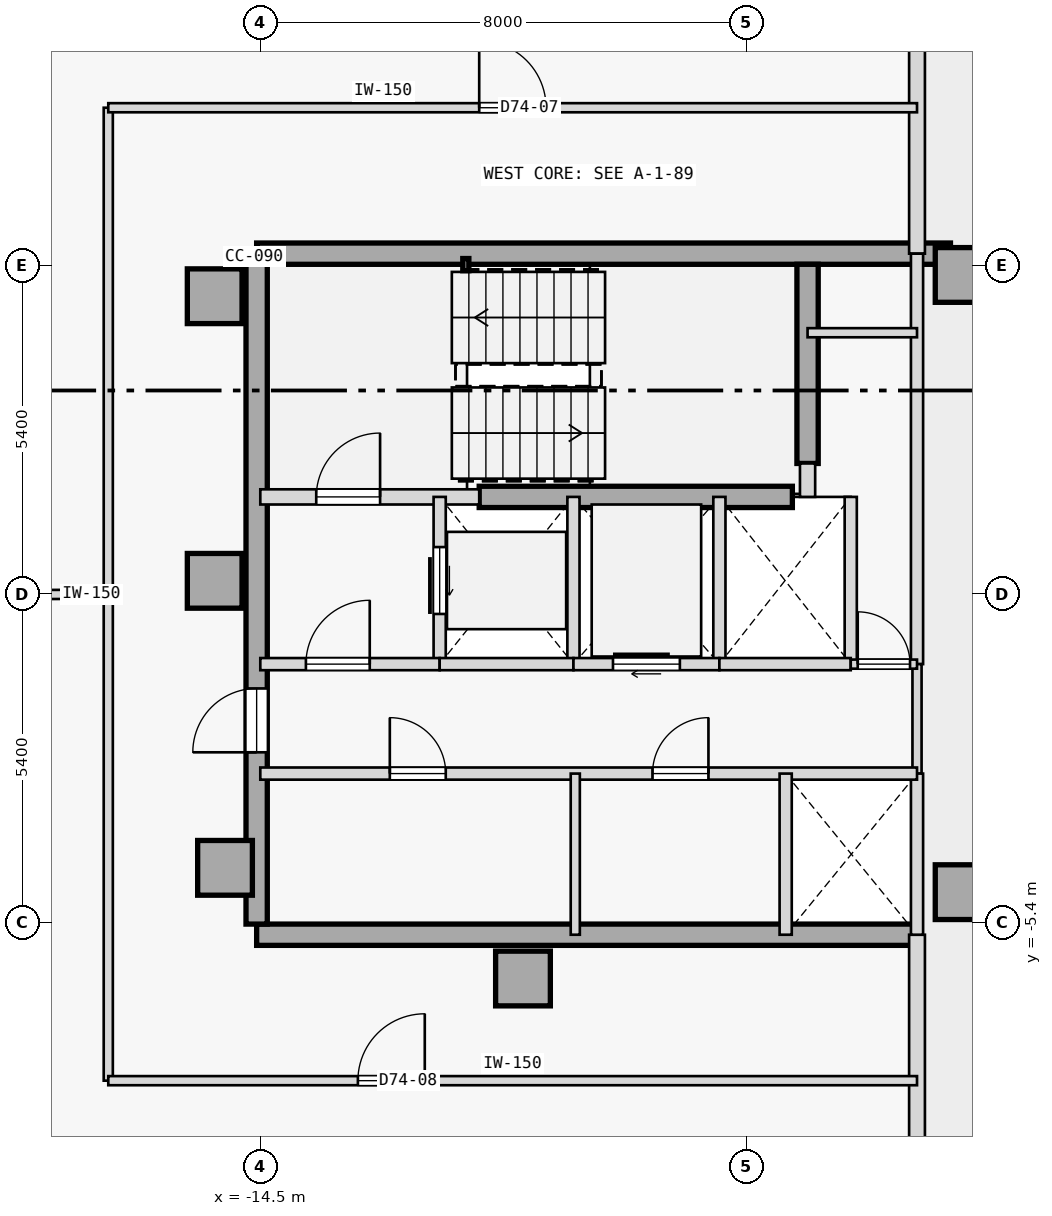
"""IFC4 building model, lengths in metres.
Left out: names, types, materials, properties, quantities, classifications, styles, units other than length and angle.
Written with IfcOpenShell. Run it as: python <this file> out.ifc"""

import sys

from ifc_helpers import new_model, si_unit, direction, frame, frame_2d, origin, origin_2d, place, context, subcontext, project, spatial, rectangle, hollow_rectangle, extrude, element, fill, save


model = new_model("IFC4")
c1 = context("Model", 3, precision=1e-05, world=origin(), true_north=direction((0.0, 1.0)))
c2 = subcontext(c1, "Body", "Model", "MODEL_VIEW")
j1 = project(units=[si_unit("LENGTHUNIT", "METRE"), si_unit("PLANEANGLEUNIT", "RADIAN")], contexts=[c1])
p1 = place(None, origin())
s1 = spatial("IfcSite", under=j1, at=p1, CompositionType="ELEMENT")
p2 = place(p1, origin())
s2 = spatial("IfcBuilding", under=s1, at=p2, CompositionType="ELEMENT")
p3 = place(p2, frame((0.0, 0.0, 275.6)))
s3 = spatial("IfcBuildingStorey", under=s2, at=p3, CompositionType="ELEMENT", Elevation=275.6)
for number, where, z_axis, x_axis in (
    (1, (-15.25, 4.9, 0.0), (0.0, 0.0, 1.0), (1.0, 0.0, 0.0)),
    (2, (-15.25, 0.22, 0.0), (0.0, 0.0, 1.0), (1.0, 0.0, 0.0)),
    (3, (-15.08, -4.5, 0.0), (0.0, 0.0, 1.0), (1.0, 0.0, 0.0)),
    (4, (-10.18, -6.32, 0.0), (0.0, 0.0, 1.0), (1.0, 0.0, 0.0)),
    (5, (-2.95, -4.9, 0.0), (0.0, 0.0, 1.0), (1.0, 0.0, 0.0)),
    (6, (-2.95, 5.25, 0.0), (0.0, 0.0, 1.0), (1.0, 0.0, 0.0)),
):
    element("IfcColumn", number, at=place(p3, frame(where, z_axis=z_axis, x_axis=x_axis)), inside=s3, PredefinedType="COLUMN", context=c2, shape_type="SweptSolid", body=[
        extrude(rectangle(XDim=0.9, YDim=0.9, at=origin_2d()), origin(), (0.0, 0.0, 1.0), 6.3),
    ])
p4 = place(p3, frame((-14.56, 5.6, 0.0), z_axis=(0.0, 0.0, 1.0), x_axis=(1.0, 0.0, 0.0)))
e7 = element("IfcWall", 7, at=p4, inside=s3, PredefinedType="SHEAR", context=c2, shape_type="SweptSolid", body=[
    extrude(rectangle(XDim=11.41, YDim=0.35, at=frame_2d((5.705, 0.0))), origin(), (0.0, 0.0, 1.0), 6.075),
])
p5 = place(p3, frame((-14.56, -5.6, 0.0), z_axis=(0.0, 0.0, 1.0), x_axis=(1.0, 0.0, 0.0)))
e8 = element("IfcWall", 8, at=p5, inside=s3, PredefinedType="SHEAR", context=c2, shape_type="SweptSolid", body=[
    extrude(rectangle(XDim=10.86, YDim=0.35, at=frame_2d((5.43, 0.0))), origin(), (0.0, 0.0, 1.0), 6.075),
])
p6 = place(p3, frame((-14.56, -5.425, 0.0), z_axis=(0.0, 0.0, 1.0), x_axis=(0.0, 1.0, 0.0)))
e9 = element("IfcWall", 9, at=p6, inside=s3, PredefinedType="SHEAR", context=c2, shape_type="SweptSolid", body=[
    extrude(rectangle(XDim=10.85, YDim=0.35, at=frame_2d((5.425, 0.0))), origin(), (0.0, 0.0, 1.0), 6.075),
])
p7 = place(p6, frame((2.825, 0.0, 0.0)))
e10 = element("IfcOpeningElement", 10, at=p7, cuts=e9, PredefinedType="OPENING", context=c2, shape_type="SweptSolid", body=[
    extrude(rectangle(XDim=1.05, YDim=2.15, at=frame_2d((0.525, 1.075))), frame((0.0, 0.185, 0.0), z_axis=(0.0, -1.0, 0.0), x_axis=(1.0, 0.0, 0.0)), (0.0, 0.0, 1.0), 0.37),
])
p8 = place(p3, frame((-5.5, 2.15, 0.0), z_axis=(0.0, 0.0, 1.0), x_axis=(0.0, 1.0, 0.0)))
e11 = element("IfcWall", 11, at=p8, inside=s3, PredefinedType="SHEAR", context=c2, shape_type="SweptSolid", body=[
    extrude(rectangle(XDim=3.275, YDim=0.35, at=frame_2d((1.638, 0.0))), origin(), (0.0, 0.0, 1.0), 6.075),
])
p9 = place(p3, frame((-10.9, 1.6, 0.0), z_axis=(0.0, 0.0, 1.0), x_axis=(1.0, 0.0, 0.0)))
e12 = element("IfcWall", 12, at=p9, inside=s3, PredefinedType="SHEAR", context=c2, shape_type="SweptSolid", body=[
    extrude(rectangle(XDim=5.15, YDim=0.35, at=frame_2d((2.575, 0.0))), origin(), (0.0, 0.0, 1.0), 6.075),
])
p10 = place(p3, frame((-11.12, 5.42, 0.0), z_axis=(0.0, 0.0, 1.0), x_axis=(1.0, 0.0, 0.0)))
e13 = element("IfcColumn", 13, at=p10, inside=s3, PredefinedType="COLUMN", context=c2, shape_type="SweptSolid", body=[
    extrude(hollow_rectangle(XDim=0.1, YDim=0.2, WallThickness=0.008, at=origin_2d()), origin(), (0.0, 0.0, 1.0), 6.3),
])
p11 = place(p3, frame((-3.7, -22.0, 0.0), z_axis=(0.0, 0.0, 1.0), x_axis=(0.0, 1.0, 0.0)))
e14 = element("IfcWall", 14, at=p11, inside=s3, PredefinedType="STANDARD", context=c2, shape_type="SweptSolid", body=[
    extrude(rectangle(XDim=16.4, YDim=0.26, at=frame_2d((8.2, 0.0))), origin(), (0.0, 0.0, 1.0), 6.075),
])
p12 = place(p3, frame((-3.7, 5.6, 0.0), z_axis=(0.0, 0.0, 1.0), x_axis=(0.0, 1.0, 0.0)))
e15 = element("IfcWall", 15, at=p12, inside=s3, PredefinedType="STANDARD", context=c2, shape_type="SweptSolid", body=[
    extrude(rectangle(XDim=10.082, YDim=0.26, at=frame_2d((5.041, 0.0))), origin(), (0.0, 0.0, 1.0), 5.625),
])
p13 = place(p12, frame((4.491, 0.0, 0.0)))
e16 = element("IfcOpeningElement", 16, at=p13, cuts=e15, PredefinedType="OPENING", context=c2, shape_type="SweptSolid", body=[
    extrude(rectangle(XDim=1.1, YDim=2.2, at=frame_2d((0.55, 1.1))), frame((0.0, 0.14, 0.0), z_axis=(0.0, -1.0, 0.0), x_axis=(1.0, 0.0, 0.0)), (0.0, 0.0, 1.0), 0.28),
])
p14 = place(p3, frame((-14.5, 1.6, 0.0), z_axis=(0.0, 0.0, 1.0), x_axis=(1.0, 0.0, 0.0)))
e17 = element("IfcWall", 17, at=p14, inside=s3, PredefinedType="STANDARD", context=c2, shape_type="SweptSolid", body=[
    extrude(rectangle(XDim=3.6, YDim=0.25, at=frame_2d((1.8, 0.0))), origin(), (0.0, 0.0, 1.0), 6.075),
])
p15 = place(p14, frame((0.92, 0.0, 0.0)))
e18 = element("IfcOpeningElement", 18, at=p15, cuts=e17, PredefinedType="OPENING", context=c2, shape_type="SweptSolid", body=[
    extrude(rectangle(XDim=1.05, YDim=2.15, at=frame_2d((0.525, 1.075))), frame((0.0, 0.135, 0.0), z_axis=(0.0, -1.0, 0.0), x_axis=(1.0, 0.0, 0.0)), (0.0, 0.0, 1.0), 0.27),
])
p16 = place(p3, frame((-5.5, 1.6, 0.0), z_axis=(0.0, 0.0, 1.0), x_axis=(0.0, 1.0, 0.0)))
e19 = element("IfcWall", 19, at=p16, inside=s3, PredefinedType="STANDARD", context=c2, shape_type="SweptSolid", body=[
    extrude(rectangle(XDim=0.55, YDim=0.25, at=frame_2d((0.275, 0.0))), origin(), (0.0, 0.0, 1.0), 6.075),
])
p17 = place(p3, frame((-3.7, -1.15, 0.0), z_axis=(0.0, 0.0, 1.0), x_axis=(0.0, 1.0, 0.0)))
e20 = element("IfcWall", 20, at=p17, inside=s3, PredefinedType="STANDARD", context=c2, shape_type="SweptSolid", body=[
    extrude(rectangle(XDim=6.75, YDim=0.2, at=frame_2d((3.375, 0.0))), origin(), (0.0, 0.0, 1.0), 6.075),
])
p18 = place(p3, frame((-3.7, -2.95, 0.0), z_axis=(0.0, 0.0, 1.0), x_axis=(0.0, 1.0, 0.0)))
e21 = element("IfcWall", 21, at=p18, inside=s3, PredefinedType="PARTITIONING", context=c2, shape_type="SweptSolid", body=[
    extrude(rectangle(XDim=1.8, YDim=0.15, at=frame_2d((0.9, 0.0))), origin(), (0.0, 0.0, 1.0), 6.075),
])
p19 = place(p3, frame((-3.7, -5.6, 0.0), z_axis=(0.0, 0.0, 1.0), x_axis=(0.0, 1.0, 0.0)))
e22 = element("IfcWall", 22, at=p19, inside=s3, PredefinedType="STANDARD", context=c2, shape_type="SweptSolid", body=[
    extrude(rectangle(XDim=2.65, YDim=0.2, at=frame_2d((1.325, 0.0))), origin(), (0.0, 0.0, 1.0), 6.075),
])
p20 = place(p3, frame((-11.55, -1.15, 0.0), z_axis=(0.0, 0.0, 1.0), x_axis=(0.0, 1.0, 0.0)))
e23 = element("IfcWall", 23, at=p20, inside=s3, PredefinedType="STANDARD", context=c2, shape_type="SweptSolid", body=[
    extrude(rectangle(XDim=2.75, YDim=0.2, at=frame_2d((1.375, 0.0))), origin(), (0.0, 0.0, 1.0), 6.075),
])
p21 = place(p20, frame((0.825, 0.0, 0.0)))
e24 = element("IfcOpeningElement", 24, at=p21, cuts=e23, PredefinedType="OPENING", context=c2, shape_type="SweptSolid", body=[
    extrude(rectangle(XDim=1.1, YDim=2.15, at=frame_2d((0.55, 1.075))), frame((0.0, 0.11, 0.0), z_axis=(0.0, -1.0, 0.0), x_axis=(1.0, 0.0, 0.0)), (0.0, 0.0, 1.0), 0.22),
])
p22 = place(p3, frame((-9.35, -1.15, 0.0), z_axis=(0.0, 0.0, 1.0), x_axis=(0.0, 1.0, 0.0)))
e25 = element("IfcWall", 25, at=p22, inside=s3, PredefinedType="STANDARD", context=c2, shape_type="SweptSolid", body=[
    extrude(rectangle(XDim=2.75, YDim=0.2, at=frame_2d((1.375, 0.0))), origin(), (0.0, 0.0, 1.0), 6.075),
])
p23 = place(p3, frame((-14.5, -1.15, 0.0), z_axis=(0.0, 0.0, 1.0), x_axis=(1.0, 0.0, 0.0)))
e26 = element("IfcWall", 26, at=p23, inside=s3, PredefinedType="STANDARD", context=c2, shape_type="SweptSolid", body=[
    extrude(rectangle(XDim=2.95, YDim=0.2, at=frame_2d((1.475, 0.0))), origin(), (0.0, 0.0, 1.0), 6.075),
])
p24 = place(p23, frame((0.75, 0.0, 0.0)))
e27 = element("IfcOpeningElement", 27, at=p24, cuts=e26, PredefinedType="OPENING", context=c2, shape_type="SweptSolid", body=[
    extrude(rectangle(XDim=1.05, YDim=2.18, at=frame_2d((0.525, 1.09))), frame((0.0, 0.11, 0.0), z_axis=(0.0, -1.0, 0.0), x_axis=(1.0, 0.0, 0.0)), (0.0, 0.0, 1.0), 0.22),
])
p25 = place(p3, frame((-11.55, -1.15, 0.0), z_axis=(0.0, 0.0, 1.0), x_axis=(1.0, 0.0, 0.0)))
e28 = element("IfcWall", 28, at=p25, inside=s3, PredefinedType="STANDARD", context=c2, shape_type="SweptSolid", body=[
    extrude(rectangle(XDim=2.2, YDim=0.2, at=frame_2d((1.1, 0.0))), origin(), (0.0, 0.0, 1.0), 6.075),
])
p26 = place(p3, frame((-6.95, -1.15, 0.0), z_axis=(0.0, 0.0, 1.0), x_axis=(0.0, 1.0, 0.0)))
e29 = element("IfcWall", 29, at=p26, inside=s3, PredefinedType="STANDARD", context=c2, shape_type="SweptSolid", body=[
    extrude(rectangle(XDim=2.75, YDim=0.2, at=frame_2d((1.375, 0.0))), origin(), (0.0, 0.0, 1.0), 6.075),
])
p27 = place(p3, frame((-9.35, -1.15, 0.0), z_axis=(0.0, 0.0, 1.0), x_axis=(1.0, 0.0, 0.0)))
e30 = element("IfcWall", 30, at=p27, inside=s3, PredefinedType="STANDARD", context=c2, shape_type="SweptSolid", body=[
    extrude(rectangle(XDim=2.4, YDim=0.2, at=frame_2d((1.2, 0.0))), origin(), (0.0, 0.0, 1.0), 6.075),
])
p28 = place(p27, frame((0.65, 0.0, 0.0)))
e31 = element("IfcOpeningElement", 31, at=p28, cuts=e30, PredefinedType="OPENING", context=c2, shape_type="SweptSolid", body=[
    extrude(rectangle(XDim=1.1, YDim=2.15, at=frame_2d((0.55, 1.075))), frame((0.0, 0.11, 0.0), z_axis=(0.0, -1.0, 0.0), x_axis=(1.0, 0.0, 0.0)), (0.0, 0.0, 1.0), 0.22),
])
p29 = place(p3, frame((-4.79, -1.15, 0.0), z_axis=(0.0, 0.0, 1.0), x_axis=(0.0, 1.0, 0.0)))
e32 = element("IfcWall", 32, at=p29, inside=s3, PredefinedType="STANDARD", context=c2, shape_type="SweptSolid", body=[
    extrude(rectangle(XDim=2.75, YDim=0.2, at=frame_2d((1.375, 0.0))), origin(), (0.0, 0.0, 1.0), 6.075),
])
p30 = place(p3, frame((-6.95, -1.15, 0.0), z_axis=(0.0, 0.0, 1.0), x_axis=(1.0, 0.0, 0.0)))
e33 = element("IfcWall", 33, at=p30, inside=s3, PredefinedType="STANDARD", context=c2, shape_type="SweptSolid", body=[
    extrude(rectangle(XDim=2.16, YDim=0.2, at=frame_2d((1.08, 0.0))), origin(), (0.0, 0.0, 1.0), 6.075),
])
p31 = place(p3, frame((-4.79, -1.15, 0.0), z_axis=(0.0, 0.0, 1.0), x_axis=(1.0, 0.0, 0.0)))
e34 = element("IfcWall", 34, at=p31, inside=s3, PredefinedType="PARTITIONING", context=c2, shape_type="SweptSolid", body=[
    extrude(rectangle(XDim=1.09, YDim=0.15, at=frame_2d((0.545, 0.0))), origin(), (0.0, 0.0, 1.0), 6.075),
])
p32 = place(p31, frame((0.115, 0.0, 0.0)))
e35 = element("IfcOpeningElement", 35, at=p32, cuts=e34, PredefinedType="OPENING", context=c2, shape_type="SweptSolid", body=[
    extrude(rectangle(XDim=0.86, YDim=2.15, at=frame_2d((0.43, 1.075))), frame((0.0, 0.085, 0.0), z_axis=(0.0, -1.0, 0.0), x_axis=(1.0, 0.0, 0.0)), (0.0, 0.0, 1.0), 0.17),
])
p33 = place(p3, frame((-14.5, -2.95, 0.0), z_axis=(0.0, 0.0, 1.0), x_axis=(1.0, 0.0, 0.0)))
e36 = element("IfcWall", 36, at=p33, inside=s3, PredefinedType="STANDARD", context=c2, shape_type="SweptSolid", body=[
    extrude(rectangle(XDim=10.8, YDim=0.2, at=frame_2d((5.4, 0.0))), origin(), (0.0, 0.0, 1.0), 6.075),
])
p34 = place(p33, frame((2.13, 0.0, 0.0)))
e37 = element("IfcOpeningElement", 37, at=p34, cuts=e36, PredefinedType="OPENING", context=c2, shape_type="SweptSolid", body=[
    extrude(rectangle(XDim=0.92, YDim=2.15, at=frame_2d((0.46, 1.075))), frame((0.0, 0.11, 0.0), z_axis=(0.0, -1.0, 0.0), x_axis=(1.0, 0.0, 0.0)), (0.0, 0.0, 1.0), 0.22),
])
p35 = place(p33, frame((6.45, 0.0, 0.0)))
e38 = element("IfcOpeningElement", 38, at=p35, cuts=e36, PredefinedType="OPENING", context=c2, shape_type="SweptSolid", body=[
    extrude(rectangle(XDim=0.92, YDim=2.15, at=frame_2d((0.46, 1.075))), frame((0.0, 0.11, 0.0), z_axis=(0.0, -1.0, 0.0), x_axis=(1.0, 0.0, 0.0)), (0.0, 0.0, 1.0), 0.22),
])
p36 = place(p3, frame((-5.86, -5.6, 0.0), z_axis=(0.0, 0.0, 1.0), x_axis=(0.0, 1.0, 0.0)))
e39 = element("IfcWall", 39, at=p36, inside=s3, PredefinedType="STANDARD", context=c2, shape_type="SweptSolid", body=[
    extrude(rectangle(XDim=2.65, YDim=0.2, at=frame_2d((1.325, 0.0))), origin(), (0.0, 0.0, 1.0), 6.075),
])
p37 = place(p3, frame((-9.32, -5.6, 0.0), z_axis=(0.0, 0.0, 1.0), x_axis=(0.0, 1.0, 0.0)))
e40 = element("IfcWall", 40, at=p37, inside=s3, PredefinedType="PARTITIONING", context=c2, shape_type="SweptSolid", body=[
    extrude(rectangle(XDim=2.65, YDim=0.15, at=frame_2d((1.325, 0.0))), origin(), (0.0, 0.0, 1.0), 6.075),
])
p38 = place(p3, frame((-5.5, 4.3, 0.0), z_axis=(0.0, 0.0, 1.0), x_axis=(1.0, 0.0, 0.0)))
e41 = element("IfcWall", 41, at=p38, inside=s3, PredefinedType="PARTITIONING", context=c2, shape_type="SweptSolid", body=[
    extrude(rectangle(XDim=1.8, YDim=0.15, at=frame_2d((0.9, 0.0))), origin(), (0.0, 0.0, 1.0), 6.075),
])
p39 = place(p3, frame((-17.0, 0.0, 0.0), z_axis=(0.0, 0.0, 1.0), x_axis=(0.0, 1.0, 0.0)))
e42 = element("IfcWall", 42, at=p39, inside=s3, PredefinedType="PARTITIONING", context=c2, shape_type="SweptSolid", body=[
    extrude(rectangle(XDim=8.0, YDim=0.15, at=frame_2d((4.0, 0.0))), origin(), (0.0, 0.0, 1.0), 6.075),
])
p40 = place(p3, frame((-17.0, 8.0, 0.0), z_axis=(0.0, 0.0, 1.0), x_axis=(1.0, 0.0, 0.0)))
e43 = element("IfcWall", 43, at=p40, inside=s3, PredefinedType="PARTITIONING", context=c2, shape_type="SweptSolid", body=[
    extrude(rectangle(XDim=13.3, YDim=0.15, at=frame_2d((6.65, 0.0))), origin(), (0.0, 0.0, 1.0), 6.075),
])
p41 = place(p40, frame((6.1, 0.0, 0.0)))
e44 = element("IfcOpeningElement", 44, at=p41, cuts=e43, PredefinedType="OPENING", context=c2, shape_type="SweptSolid", body=[
    extrude(rectangle(XDim=1.1, YDim=2.15, at=frame_2d((0.55, 1.075))), frame((0.0, 0.085, 0.0), z_axis=(0.0, -1.0, 0.0), x_axis=(1.0, 0.0, 0.0)), (0.0, 0.0, 1.0), 0.17),
])
p42 = place(p3, frame((-17.0, -8.0, 0.0), z_axis=(0.0, 0.0, 1.0), x_axis=(0.0, 1.0, 0.0)))
e45 = element("IfcWall", 45, at=p42, inside=s3, PredefinedType="PARTITIONING", context=c2, shape_type="SweptSolid", body=[
    extrude(rectangle(XDim=8.0, YDim=0.15, at=frame_2d((4.0, 0.0))), origin(), (0.0, 0.0, 1.0), 6.075),
])
p43 = place(p3, frame((-17.0, -8.0, 0.0), z_axis=(0.0, 0.0, 1.0), x_axis=(1.0, 0.0, 0.0)))
e46 = element("IfcWall", 46, at=p43, inside=s3, PredefinedType="PARTITIONING", context=c2, shape_type="SweptSolid", body=[
    extrude(rectangle(XDim=13.3, YDim=0.15, at=frame_2d((6.65, 0.0))), origin(), (0.0, 0.0, 1.0), 6.075),
])
p44 = place(p43, frame((4.105, 0.0, 0.0)))
e47 = element("IfcOpeningElement", 47, at=p44, cuts=e46, PredefinedType="OPENING", context=c2, shape_type="SweptSolid", body=[
    extrude(rectangle(XDim=1.1, YDim=2.15, at=frame_2d((0.55, 1.075))), frame((0.0, 0.085, 0.0), z_axis=(0.0, -1.0, 0.0), x_axis=(1.0, 0.0, 0.0)), (0.0, 0.0, 1.0), 0.17),
])
p45 = place(p3, frame((-29.838, -0.061, 0.0), z_axis=(0.0, 0.0, 1.0), x_axis=(0.999988608793, 0.004773079162, 0.0)))
e48 = element("IfcWall", 48, at=p45, inside=s3, PredefinedType="PARTITIONING", context=c2, shape_type="SweptSolid", body=[
    extrude(rectangle(XDim=12.839, YDim=0.15, at=frame_2d((6.419, 0.0))), origin(), (0.0, 0.0, 1.0), 6.075),
])
p46 = place(p15, origin())
e49 = element("IfcDoor", 49, at=p46, inside=s3, OperationType="SINGLE_SWING_RIGHT", PredefinedType="DOOR", context=c2, shape_type="SweptSolid", body=[
    extrude(rectangle(XDim=1.05, YDim=2.15, at=frame_2d((0.525, 1.075))), frame((0.0, 0.025, 0.0), z_axis=(0.0, -1.0, 0.0), x_axis=(1.0, 0.0, 0.0)), (0.0, 0.0, 1.0), 0.05),
])
fill(e18, e49)
p47 = place(p24, origin())
e50 = element("IfcDoor", 50, at=p47, inside=s3, OperationType="SINGLE_SWING_RIGHT", PredefinedType="DOOR", context=c2, shape_type="SweptSolid", body=[
    extrude(rectangle(XDim=1.05, YDim=2.18, at=frame_2d((0.525, 1.09))), frame((0.0, 0.025, 0.0), z_axis=(0.0, -1.0, 0.0), x_axis=(1.0, 0.0, 0.0)), (0.0, 0.0, 1.0), 0.05),
])
fill(e27, e50)
p48 = place(p21, origin())
e51 = element("IfcDoor", 51, at=p48, inside=s3, OperationType="SLIDING_TO_RIGHT", PredefinedType="DOOR", context=c2, shape_type="SweptSolid", body=[
    extrude(rectangle(XDim=1.1, YDim=2.15, at=frame_2d((0.55, 1.075))), frame((0.0, 0.025, 0.0), z_axis=(0.0, -1.0, 0.0), x_axis=(1.0, 0.0, 0.0)), (0.0, 0.0, 1.0), 0.05),
])
fill(e24, e51)
p49 = place(p28, origin())
e52 = element("IfcDoor", 52, at=p49, inside=s3, OperationType="SLIDING_TO_RIGHT", PredefinedType="DOOR", context=c2, shape_type="SweptSolid", body=[
    extrude(rectangle(XDim=1.1, YDim=2.15, at=frame_2d((0.55, 1.075))), frame((0.0, 0.025, 0.0), z_axis=(0.0, -1.0, 0.0), x_axis=(1.0, 0.0, 0.0)), (0.0, 0.0, 1.0), 0.05),
])
fill(e31, e52)
p50 = place(p34, origin())
e53 = element("IfcDoor", 53, at=p50, inside=s3, OperationType="SINGLE_SWING_LEFT", PredefinedType="DOOR", context=c2, shape_type="SweptSolid", body=[
    extrude(rectangle(XDim=0.92, YDim=2.15, at=frame_2d((0.46, 1.075))), frame((0.0, 0.025, 0.0), z_axis=(0.0, -1.0, 0.0), x_axis=(1.0, 0.0, 0.0)), (0.0, 0.0, 1.0), 0.05),
])
fill(e37, e53)
p51 = place(p35, origin())
e54 = element("IfcDoor", 54, at=p51, inside=s3, OperationType="SINGLE_SWING_RIGHT", PredefinedType="DOOR", context=c2, shape_type="SweptSolid", body=[
    extrude(rectangle(XDim=0.92, YDim=2.15, at=frame_2d((0.46, 1.075))), frame((0.0, 0.025, 0.0), z_axis=(0.0, -1.0, 0.0), x_axis=(1.0, 0.0, 0.0)), (0.0, 0.0, 1.0), 0.05),
])
fill(e38, e54)
p52 = place(p32, origin())
e55 = element("IfcDoor", 55, at=p52, inside=s3, OperationType="SINGLE_SWING_LEFT", PredefinedType="DOOR", context=c2, shape_type="SweptSolid", body=[
    extrude(rectangle(XDim=0.86, YDim=2.15, at=frame_2d((0.43, 1.075))), frame((0.0, 0.025, 0.0), z_axis=(0.0, -1.0, 0.0), x_axis=(1.0, 0.0, 0.0)), (0.0, 0.0, 1.0), 0.05),
])
fill(e35, e55)
p53 = place(p41, origin())
e56 = element("IfcDoor", 56, at=p53, inside=s3, OperationType="SINGLE_SWING_LEFT", PredefinedType="DOOR", context=c2, shape_type="SweptSolid", body=[
    extrude(rectangle(XDim=1.1, YDim=2.15, at=frame_2d((0.55, 1.075))), frame((0.0, 0.025, 0.0), z_axis=(0.0, -1.0, 0.0), x_axis=(1.0, 0.0, 0.0)), (0.0, 0.0, 1.0), 0.05),
])
fill(e44, e56)
p54 = place(p44, origin())
e57 = element("IfcDoor", 57, at=p54, inside=s3, OperationType="SINGLE_SWING_RIGHT", PredefinedType="DOOR", context=c2, shape_type="SweptSolid", body=[
    extrude(rectangle(XDim=1.1, YDim=2.15, at=frame_2d((0.55, 1.075))), frame((0.0, 0.025, 0.0), z_axis=(0.0, -1.0, 0.0), x_axis=(1.0, 0.0, 0.0)), (0.0, 0.0, 1.0), 0.05),
])
fill(e47, e57)
p55 = place(p7, origin())
e58 = element("IfcDoor", 58, at=p55, inside=s3, OperationType="SINGLE_SWING_LEFT", PredefinedType="DOOR", context=c2, shape_type="SweptSolid", body=[
    extrude(rectangle(XDim=1.05, YDim=2.15, at=frame_2d((0.525, 1.075))), frame((0.0, 0.025, 0.0), z_axis=(0.0, -1.0, 0.0), x_axis=(1.0, 0.0, 0.0)), (0.0, 0.0, 1.0), 0.05),
])
fill(e10, e58)
save(model, sys.argv[1])
